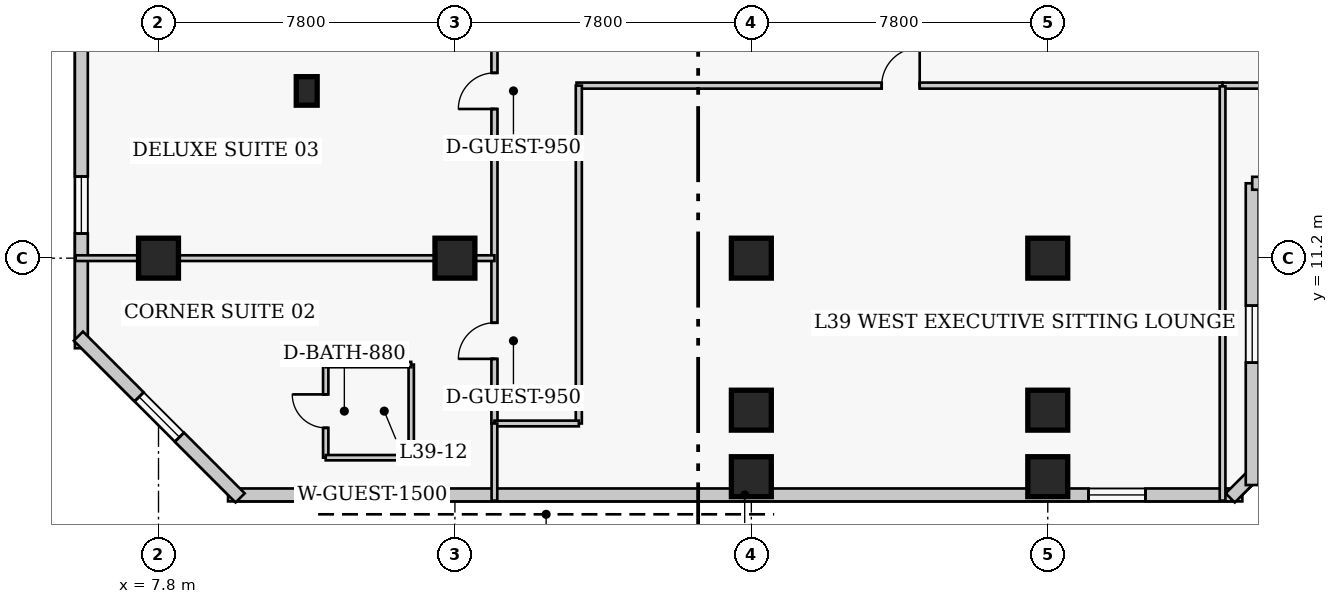
"""IFC4 building model, lengths in metres.
Left out: names, types, materials, properties, quantities, classifications, styles, units other than length and angle.
Written with IfcOpenShell. Run it as: python <this file> out.ifc"""

import sys

from ifc_helpers import new_model, si_unit, direction, frame, frame_2d, origin, origin_2d, place, context, subcontext, project, spatial, rectangle, extrude, element, fill, save


model = new_model("IFC4")
c1 = context("Model", 3, precision=1e-05, world=origin(), true_north=direction((0.0, 1.0)))
c2 = subcontext(c1, "Body", "Model", "MODEL_VIEW")
j1 = project(units=[si_unit("LENGTHUNIT", "METRE"), si_unit("PLANEANGLEUNIT", "RADIAN")], contexts=[c1])
p1 = place(None, origin())
s1 = spatial("IfcSite", under=j1, at=p1, CompositionType="ELEMENT")
p2 = place(p1, origin())
s2 = spatial("IfcBuilding", under=s1, at=p2, CompositionType="ELEMENT")
p3 = place(p2, frame((0.0, 0.0, 157.4)))
s3 = spatial("IfcBuildingStorey", under=s2, at=p3, CompositionType="ELEMENT", Elevation=157.4)
for number, where, z_axis, x_axis in (
    (1, (7.8, 11.2, 0.0), (0.0, 0.0, 1.0), (1.0, 0.0, 0.0)),
    (2, (15.6, 11.2, 0.0), (0.0, 0.0, 1.0), (1.0, 0.0, 0.0)),
    (3, (23.4, 11.2, 0.0), (0.0, 0.0, 1.0), (1.0, 0.0, 0.0)),
    (4, (31.2, 11.2, 0.0), (0.0, 0.0, 1.0), (1.0, 0.0, 0.0)),
    (5, (23.4, 7.2, 0.0), (0.0, 0.0, 1.0), (1.0, 0.0, 0.0)),
    (6, (31.2, 7.2, 0.0), (0.0, 0.0, 1.0), (1.0, 0.0, 0.0)),
    (7, (23.4, 5.45, 0.0), (0.0, 0.0, 1.0), (1.0, 0.0, 0.0)),
    (8, (31.2, 5.45, 0.0), (0.0, 0.0, 1.0), (1.0, 0.0, 0.0)),
):
    element("IfcColumn", number, at=place(p3, frame(where, z_axis=z_axis, x_axis=x_axis)), inside=s3, PredefinedType="COLUMN", context=c2, shape_type="SweptSolid", body=[
        extrude(rectangle(XDim=1.05, YDim=1.05, at=origin_2d()), origin(), (0.0, 0.0, 1.0), 3.8),
    ])
p4 = place(p3, frame((11.7, 15.6, 0.0), z_axis=(0.0, 0.0, 1.0), x_axis=(1.0, 0.0, 0.0)))
e9 = element("IfcColumn", 9, at=p4, inside=s3, PredefinedType="PILASTER", context=c2, shape_type="SweptSolid", body=[
    extrude(rectangle(XDim=0.55, YDim=0.75, at=origin_2d()), origin(), (0.0, 0.0, 1.0), 3.8),
])
p5 = place(p3, frame((9.63, 4.97, 0.0), z_axis=(0.0, 0.0, 1.0), x_axis=(1.0, 0.0, 0.0)))
e10 = element("IfcWall", 10, at=p5, inside=s3, PredefinedType="SOLIDWALL", context=c2, shape_type="SweptSolid", body=[
    extrude(rectangle(XDim=26.69, YDim=0.34, at=frame_2d((13.345, 0.0))), origin(), (0.0, 0.0, 1.0), 3.55),
])
p6 = place(p5, frame((3.048, 0.0, 0.85)))
e11 = element("IfcOpeningElement", 11, at=p6, cuts=e10, PredefinedType="OPENING", context=c2, shape_type="SweptSolid", body=[
    extrude(rectangle(XDim=1.5, YDim=1.75, at=frame_2d((0.75, 0.875))), frame((0.0, 0.18, 0.0), z_axis=(0.0, -1.0, 0.0), x_axis=(1.0, 0.0, 0.0)), (0.0, 0.0, 1.0), 0.36),
])
p7 = place(p5, frame((22.642, 0.0, 0.85)))
e12 = element("IfcOpeningElement", 12, at=p7, cuts=e10, PredefinedType="OPENING", context=c2, shape_type="SweptSolid", body=[
    extrude(rectangle(XDim=1.5, YDim=1.75, at=frame_2d((0.75, 0.875))), frame((0.0, 0.18, 0.0), z_axis=(0.0, -1.0, 0.0), x_axis=(1.0, 0.0, 0.0)), (0.0, 0.0, 1.0), 0.36),
])
p8 = place(p3, frame((36.001, 4.892, 0.0), z_axis=(0.0, 0.0, 1.0), x_axis=(0.707106781187, 0.707106781187, 0.0)))
e13 = element("IfcWall", 13, at=p8, inside=s3, PredefinedType="SOLIDWALL", context=c2, shape_type="SweptSolid", body=[
    extrude(rectangle(XDim=0.929, YDim=0.34, at=frame_2d((0.464, 0.0))), origin(), (0.0, 0.0, 1.0), 3.55),
])
p9 = place(p3, frame((36.58, 5.23, 0.0), z_axis=(0.0, 0.0, 1.0), x_axis=(0.0, 1.0, 0.0)))
e14 = element("IfcWall", 14, at=p9, inside=s3, PredefinedType="SOLIDWALL", context=c2, shape_type="SweptSolid", body=[
    extrude(rectangle(XDim=7.94, YDim=0.34, at=frame_2d((3.97, 0.0))), origin(), (0.0, 0.0, 1.0), 3.55),
])
p10 = place(p9, frame((3.22, 0.0, 0.85)))
e15 = element("IfcOpeningElement", 15, at=p10, cuts=e14, PredefinedType="OPENING", context=c2, shape_type="SweptSolid", body=[
    extrude(rectangle(XDim=1.5, YDim=1.75, at=frame_2d((0.75, 0.875))), frame((0.0, 0.18, 0.0), z_axis=(0.0, -1.0, 0.0), x_axis=(1.0, 0.0, 0.0)), (0.0, 0.0, 1.0), 0.36),
])
p11 = place(p3, frame((36.58, 13.17, 0.0), z_axis=(0.0, 0.0, 1.0), x_axis=(1.0, 0.0, 0.0)))
e16 = element("IfcWall", 16, at=p11, inside=s3, PredefinedType="SOLIDWALL", context=c2, shape_type="SweptSolid", body=[
    extrude(rectangle(XDim=4.84, YDim=0.34, at=frame_2d((2.42, 0.0))), origin(), (0.0, 0.0, 1.0), 3.55),
])
p12 = place(p11, frame((1.67, 0.0, 0.85)))
e17 = element("IfcOpeningElement", 17, at=p12, cuts=e16, PredefinedType="OPENING", context=c2, shape_type="SweptSolid", body=[
    extrude(rectangle(XDim=1.5, YDim=1.75, at=frame_2d((0.75, 0.875))), frame((0.0, 0.18, 0.0), z_axis=(0.0, -1.0, 0.0), x_axis=(1.0, 0.0, 0.0)), (0.0, 0.0, 1.0), 0.36),
])
p13 = place(p3, frame((5.77, 38.97, 0.0), z_axis=(0.0, 0.0, 1.0), x_axis=(0.0, -1.0, 0.0)))
e18 = element("IfcWall", 18, at=p13, inside=s3, PredefinedType="SOLIDWALL", context=c2, shape_type="SweptSolid", body=[
    extrude(rectangle(XDim=30.14, YDim=0.34, at=frame_2d((15.07, 0.0))), origin(), (0.0, 0.0, 1.0), 3.55),
])
p14 = place(p13, frame((3.667, 0.0, 0.85)))
e19 = element("IfcOpeningElement", 19, at=p14, cuts=e18, PredefinedType="OPENING", context=c2, shape_type="SweptSolid", body=[
    extrude(rectangle(XDim=1.5, YDim=1.75, at=frame_2d((0.75, 0.875))), frame((0.0, 0.18, 0.0), z_axis=(0.0, -1.0, 0.0), x_axis=(1.0, 0.0, 0.0)), (0.0, 0.0, 1.0), 0.36),
])
p15 = place(p13, frame((10.552, 0.0, 0.85)))
e20 = element("IfcOpeningElement", 20, at=p15, cuts=e18, PredefinedType="OPENING", context=c2, shape_type="SweptSolid", body=[
    extrude(rectangle(XDim=1.5, YDim=1.75, at=frame_2d((0.75, 0.875))), frame((0.0, 0.18, 0.0), z_axis=(0.0, -1.0, 0.0), x_axis=(1.0, 0.0, 0.0)), (0.0, 0.0, 1.0), 0.36),
])
p16 = place(p13, frame((16.938, 0.0, 0.85)))
e21 = element("IfcOpeningElement", 21, at=p16, cuts=e18, PredefinedType="OPENING", context=c2, shape_type="SweptSolid", body=[
    extrude(rectangle(XDim=1.5, YDim=1.75, at=frame_2d((0.75, 0.875))), frame((0.0, 0.18, 0.0), z_axis=(0.0, -1.0, 0.0), x_axis=(1.0, 0.0, 0.0)), (0.0, 0.0, 1.0), 0.36),
])
p17 = place(p13, frame((25.623, 0.0, 0.85)))
e22 = element("IfcOpeningElement", 22, at=p17, cuts=e18, PredefinedType="OPENING", context=c2, shape_type="SweptSolid", body=[
    extrude(rectangle(XDim=1.5, YDim=1.75, at=frame_2d((0.75, 0.875))), frame((0.0, 0.18, 0.0), z_axis=(0.0, -1.0, 0.0), x_axis=(1.0, 0.0, 0.0)), (0.0, 0.0, 1.0), 0.36),
])
p18 = place(p3, frame((5.692, 9.148, 0.0), z_axis=(0.0, 0.0, 1.0), x_axis=(0.707106781187, -0.707106781187, 0.0)))
e23 = element("IfcWall", 23, at=p18, inside=s3, PredefinedType="SOLIDWALL", context=c2, shape_type="SweptSolid", body=[
    extrude(rectangle(XDim=6.02, YDim=0.34, at=frame_2d((3.01, 0.0))), origin(), (0.0, 0.0, 1.0), 3.55),
])
p19 = place(p18, frame((2.26, 0.0, 0.85)))
e24 = element("IfcOpeningElement", 24, at=p19, cuts=e23, PredefinedType="OPENING", context=c2, shape_type="SweptSolid", body=[
    extrude(rectangle(XDim=1.5, YDim=1.75, at=frame_2d((0.75, 0.875))), frame((0.0, 0.18, 0.0), z_axis=(0.0, -1.0, 0.0), x_axis=(1.0, 0.0, 0.0)), (0.0, 0.0, 1.0), 0.36),
])
p20 = place(p3, frame((18.8, 15.74, 0.0), z_axis=(0.0, 0.0, 1.0), x_axis=(1.0, 0.0, 0.0)))
e25 = element("IfcWall", 25, at=p20, inside=s3, PredefinedType="PARTITIONING", context=c2, shape_type="SweptSolid", body=[
    extrude(rectangle(XDim=17.0, YDim=0.16, at=frame_2d((8.5, 0.0))), origin(), (0.0, 0.0, 1.0), 3.55),
])
p21 = place(p20, frame((8.03, 0.0, 0.0)))
e26 = element("IfcOpeningElement", 26, at=p21, cuts=e25, PredefinedType="OPENING", context=c2, shape_type="SweptSolid", body=[
    extrude(rectangle(XDim=1.0, YDim=2.15, at=frame_2d((0.5, 1.075))), frame((0.0, 0.09, 0.0), z_axis=(0.0, -1.0, 0.0), x_axis=(1.0, 0.0, 0.0)), (0.0, 0.0, 1.0), 0.18),
])
p22 = place(p3, frame((35.8, 15.74, 0.0), z_axis=(0.0, 0.0, 1.0), x_axis=(1.0, 0.0, 0.0)))
e27 = element("IfcWall", 27, at=p22, inside=s3, PredefinedType="PARTITIONING", context=c2, shape_type="SweptSolid", body=[
    extrude(rectangle(XDim=23.5, YDim=0.16, at=frame_2d((11.75, 0.0))), origin(), (0.0, 0.0, 1.0), 3.55),
])
p23 = place(p22, frame((3.66, 0.0, 0.0)))
e28 = element("IfcOpeningElement", 28, at=p23, cuts=e27, PredefinedType="OPENING", context=c2, shape_type="SweptSolid", body=[
    extrude(rectangle(XDim=0.95, YDim=2.1, at=frame_2d((0.475, 1.05))), frame((0.0, 0.09, 0.0), z_axis=(0.0, -1.0, 0.0), x_axis=(1.0, 0.0, 0.0)), (0.0, 0.0, 1.0), 0.18),
])
p24 = place(p22, frame((16.805, 0.0, 0.0)))
e29 = element("IfcOpeningElement", 29, at=p24, cuts=e27, PredefinedType="OPENING", context=c2, shape_type="SweptSolid", body=[
    extrude(rectangle(XDim=1.0, YDim=2.15, at=frame_2d((0.5, 1.075))), frame((0.0, 0.09, 0.0), z_axis=(0.0, -1.0, 0.0), x_axis=(1.0, 0.0, 0.0)), (0.0, 0.0, 1.0), 0.18),
])
p25 = place(p3, frame((16.64, 6.85, 0.0), z_axis=(0.0, 0.0, 1.0), x_axis=(0.0, 1.0, 0.0)))
e30 = element("IfcWall", 30, at=p25, inside=s3, PredefinedType="PARTITIONING", context=c2, shape_type="SweptSolid", body=[
    extrude(rectangle(XDim=33.8, YDim=0.16, at=frame_2d((16.9, 0.0))), origin(), (0.0, 0.0, 1.0), 3.55),
])
p26 = place(p25, frame((1.7, 0.0, 0.0)))
e31 = element("IfcOpeningElement", 31, at=p26, cuts=e30, PredefinedType="OPENING", context=c2, shape_type="SweptSolid", body=[
    extrude(rectangle(XDim=0.95, YDim=2.1, at=frame_2d((0.475, 1.05))), frame((0.0, 0.09, 0.0), z_axis=(0.0, -1.0, 0.0), x_axis=(1.0, 0.0, 0.0)), (0.0, 0.0, 1.0), 0.18),
])
p27 = place(p25, frame((8.275, 0.0, 0.0)))
e32 = element("IfcOpeningElement", 32, at=p27, cuts=e30, PredefinedType="OPENING", context=c2, shape_type="SweptSolid", body=[
    extrude(rectangle(XDim=0.95, YDim=2.1, at=frame_2d((0.475, 1.05))), frame((0.0, 0.09, 0.0), z_axis=(0.0, -1.0, 0.0), x_axis=(1.0, 0.0, 0.0)), (0.0, 0.0, 1.0), 0.18),
])
p28 = place(p25, frame((17.075, 0.0, 0.0)))
e33 = element("IfcOpeningElement", 33, at=p28, cuts=e30, PredefinedType="OPENING", context=c2, shape_type="SweptSolid", body=[
    extrude(rectangle(XDim=0.95, YDim=2.1, at=frame_2d((0.475, 1.05))), frame((0.0, 0.09, 0.0), z_axis=(0.0, -1.0, 0.0), x_axis=(1.0, 0.0, 0.0)), (0.0, 0.0, 1.0), 0.18),
])
p29 = place(p25, frame((25.125, 0.0, 0.0)))
e34 = element("IfcOpeningElement", 34, at=p29, cuts=e30, PredefinedType="OPENING", context=c2, shape_type="SweptSolid", body=[
    extrude(rectangle(XDim=0.95, YDim=2.1, at=frame_2d((0.475, 1.05))), frame((0.0, 0.09, 0.0), z_axis=(0.0, -1.0, 0.0), x_axis=(1.0, 0.0, 0.0)), (0.0, 0.0, 1.0), 0.18),
])
p30 = place(p25, frame((32.36, 0.0, 0.0)))
e35 = element("IfcOpeningElement", 35, at=p30, cuts=e30, PredefinedType="OPENING", context=c2, shape_type="SweptSolid", body=[
    extrude(rectangle(XDim=1.0, YDim=2.15, at=frame_2d((0.5, 1.075))), frame((0.0, 0.09, 0.0), z_axis=(0.0, -1.0, 0.0), x_axis=(1.0, 0.0, 0.0)), (0.0, 0.0, 1.0), 0.18),
])
p31 = place(p3, frame((18.86, 6.85, 0.0), z_axis=(0.0, 0.0, 1.0), x_axis=(0.0, 1.0, 0.0)))
e36 = element("IfcWall", 36, at=p31, inside=s3, PredefinedType="PARTITIONING", context=c2, shape_type="SweptSolid", body=[
    extrude(rectangle(XDim=8.89, YDim=0.16, at=frame_2d((4.445, 0.0))), origin(), (0.0, 0.0, 1.0), 3.55),
])
p32 = place(p3, frame((16.64, 6.85, 0.0), z_axis=(0.0, 0.0, 1.0), x_axis=(1.0, 0.0, 0.0)))
e37 = element("IfcWall", 37, at=p32, inside=s3, PredefinedType="PARTITIONING", context=c2, shape_type="SweptSolid", body=[
    extrude(rectangle(XDim=2.22, YDim=0.15, at=frame_2d((1.11, 0.0))), origin(), (0.0, 0.0, 1.0), 3.55),
])
p33 = place(p3, frame((35.8, 4.82, 0.0), z_axis=(0.0, 0.0, 1.0), x_axis=(0.0, 1.0, 0.0)))
e38 = element("IfcWall", 38, at=p33, inside=s3, PredefinedType="PARTITIONING", context=c2, shape_type="SweptSolid", body=[
    extrude(rectangle(XDim=10.9, YDim=0.15, at=frame_2d((5.45, 0.0))), origin(), (0.0, 0.0, 1.0), 3.55),
])
p34 = place(p3, frame((16.64, 4.82, 0.0), z_axis=(0.0, 0.0, 1.0), x_axis=(0.0, 1.0, 0.0)))
e39 = element("IfcWall", 39, at=p34, inside=s3, PredefinedType="PARTITIONING", context=c2, shape_type="SweptSolid", body=[
    extrude(rectangle(XDim=2.03, YDim=0.15, at=frame_2d((1.015, 0.0))), origin(), (0.0, 0.0, 1.0), 3.55),
])
p35 = place(p3, frame((12.2, 5.95, 0.0), z_axis=(0.0, 0.0, 1.0), x_axis=(0.0, 1.0, 0.0)))
e40 = element("IfcWall", 40, at=p35, inside=s3, PredefinedType="PLUMBINGWALL", context=c2, shape_type="SweptSolid", body=[
    extrude(rectangle(XDim=2.45, YDim=0.14, at=frame_2d((1.225, 0.0))), origin(), (0.0, 0.0, 1.0), 3.55),
])
p36 = place(p35, frame((0.785, 0.0, 0.0)))
e41 = element("IfcOpeningElement", 41, at=p36, cuts=e40, PredefinedType="OPENING", context=c2, shape_type="SweptSolid", body=[
    extrude(rectangle(XDim=0.88, YDim=2.05, at=frame_2d((0.44, 1.025))), frame((0.0, 0.08, 0.0), z_axis=(0.0, -1.0, 0.0), x_axis=(1.0, 0.0, 0.0)), (0.0, 0.0, 1.0), 0.16),
])
p37 = place(p3, frame((14.45, 5.95, 0.0), z_axis=(0.0, 0.0, 1.0), x_axis=(0.0, 1.0, 0.0)))
e42 = element("IfcWall", 42, at=p37, inside=s3, PredefinedType="PLUMBINGWALL", context=c2, shape_type="SweptSolid", body=[
    extrude(rectangle(XDim=2.45, YDim=0.14, at=frame_2d((1.225, 0.0))), origin(), (0.0, 0.0, 1.0), 3.55),
])
for number, where, z_axis, x_axis in (
    (43, (12.2, 5.95, 0.0), (0.0, 0.0, 1.0), (1.0, 0.0, 0.0)),
    (44, (12.2, 8.4, 0.0), (0.0, 0.0, 1.0), (1.0, 0.0, 0.0)),
):
    element("IfcWall", number, at=place(p3, frame(where, z_axis=z_axis, x_axis=x_axis)), inside=s3, PredefinedType="PLUMBINGWALL", context=c2, shape_type="SweptSolid", body=[
        extrude(rectangle(XDim=2.25, YDim=0.14, at=frame_2d((1.125, 0.0))), origin(), (0.0, 0.0, 1.0), 3.55),
    ])
p38 = place(p3, frame((5.62, 11.2, 0.0), z_axis=(0.0, 0.0, 1.0), x_axis=(1.0, 0.0, 0.0)))
e45 = element("IfcWall", 45, at=p38, inside=s3, PredefinedType="PARTITIONING", context=c2, shape_type="SweptSolid", body=[
    extrude(rectangle(XDim=11.02, YDim=0.15, at=frame_2d((5.51, 0.0))), origin(), (0.0, 0.0, 1.0), 2.778),
])
p39 = place(p6, origin())
e46 = element("IfcWindow", 46, at=p39, inside=s3, PartitioningType="SINGLE_PANEL", PredefinedType="WINDOW", context=c2, shape_type="SweptSolid", body=[
    extrude(rectangle(XDim=1.5, YDim=1.75, at=frame_2d((0.75, 0.875))), frame((0.0, 0.03, 0.0), z_axis=(0.0, -1.0, 0.0), x_axis=(1.0, 0.0, 0.0)), (0.0, 0.0, 1.0), 0.06),
])
fill(e11, e46)
p40 = place(p7, origin())
e47 = element("IfcWindow", 47, at=p40, inside=s3, PartitioningType="SINGLE_PANEL", PredefinedType="WINDOW", context=c2, shape_type="SweptSolid", body=[
    extrude(rectangle(XDim=1.5, YDim=1.75, at=frame_2d((0.75, 0.875))), frame((0.0, 0.03, 0.0), z_axis=(0.0, -1.0, 0.0), x_axis=(1.0, 0.0, 0.0)), (0.0, 0.0, 1.0), 0.06),
])
fill(e12, e47)
p41 = place(p10, origin())
e48 = element("IfcWindow", 48, at=p41, inside=s3, PartitioningType="SINGLE_PANEL", PredefinedType="WINDOW", context=c2, shape_type="SweptSolid", body=[
    extrude(rectangle(XDim=1.5, YDim=1.75, at=frame_2d((0.75, 0.875))), frame((0.0, 0.03, 0.0), z_axis=(0.0, -1.0, 0.0), x_axis=(1.0, 0.0, 0.0)), (0.0, 0.0, 1.0), 0.06),
])
fill(e15, e48)
p42 = place(p17, origin())
e49 = element("IfcWindow", 49, at=p42, inside=s3, PartitioningType="SINGLE_PANEL", PredefinedType="WINDOW", context=c2, shape_type="SweptSolid", body=[
    extrude(rectangle(XDim=1.5, YDim=1.75, at=frame_2d((0.75, 0.875))), frame((0.0, 0.03, 0.0), z_axis=(0.0, -1.0, 0.0), x_axis=(1.0, 0.0, 0.0)), (0.0, 0.0, 1.0), 0.06),
])
fill(e22, e49)
p43 = place(p19, origin())
e50 = element("IfcWindow", 50, at=p43, inside=s3, PartitioningType="SINGLE_PANEL", PredefinedType="WINDOW", context=c2, shape_type="SweptSolid", body=[
    extrude(rectangle(XDim=1.5, YDim=1.75, at=frame_2d((0.75, 0.875))), frame((0.0, 0.03, 0.0), z_axis=(0.0, -1.0, 0.0), x_axis=(1.0, 0.0, 0.0)), (0.0, 0.0, 1.0), 0.06),
])
fill(e24, e50)
p44 = place(p21, origin())
e51 = element("IfcDoor", 51, at=p44, inside=s3, OperationType="SINGLE_SWING_RIGHT", PredefinedType="DOOR", context=c2, shape_type="SweptSolid", body=[
    extrude(rectangle(XDim=1.0, YDim=2.15, at=frame_2d((0.5, 1.075))), frame((0.0, 0.025, 0.0), z_axis=(0.0, -1.0, 0.0), x_axis=(1.0, 0.0, 0.0)), (0.0, 0.0, 1.0), 0.05),
])
fill(e26, e51)
p45 = place(p36, origin())
e52 = element("IfcDoor", 52, at=p45, inside=s3, OperationType="SINGLE_SWING_RIGHT", PredefinedType="DOOR", context=c2, shape_type="SweptSolid", body=[
    extrude(rectangle(XDim=0.88, YDim=2.05, at=frame_2d((0.44, 1.025))), frame((0.0, 0.025, 0.0), z_axis=(0.0, -1.0, 0.0), x_axis=(1.0, 0.0, 0.0)), (0.0, 0.0, 1.0), 0.05),
])
fill(e41, e52)
p46 = place(p26, origin())
e53 = element("IfcDoor", 53, at=p46, inside=s3, OperationType="SINGLE_SWING_LEFT", PredefinedType="DOOR", context=c2, shape_type="SweptSolid", body=[
    extrude(rectangle(XDim=0.95, YDim=2.1, at=frame_2d((0.475, 1.05))), frame((0.0, 0.025, 0.0), z_axis=(0.0, -1.0, 0.0), x_axis=(1.0, 0.0, 0.0)), (0.0, 0.0, 1.0), 0.05),
])
fill(e31, e53)
p47 = place(p27, origin())
e54 = element("IfcDoor", 54, at=p47, inside=s3, OperationType="SINGLE_SWING_LEFT", PredefinedType="DOOR", context=c2, shape_type="SweptSolid", body=[
    extrude(rectangle(XDim=0.95, YDim=2.1, at=frame_2d((0.475, 1.05))), frame((0.0, 0.025, 0.0), z_axis=(0.0, -1.0, 0.0), x_axis=(1.0, 0.0, 0.0)), (0.0, 0.0, 1.0), 0.05),
])
fill(e32, e54)
save(model, sys.argv[1])
